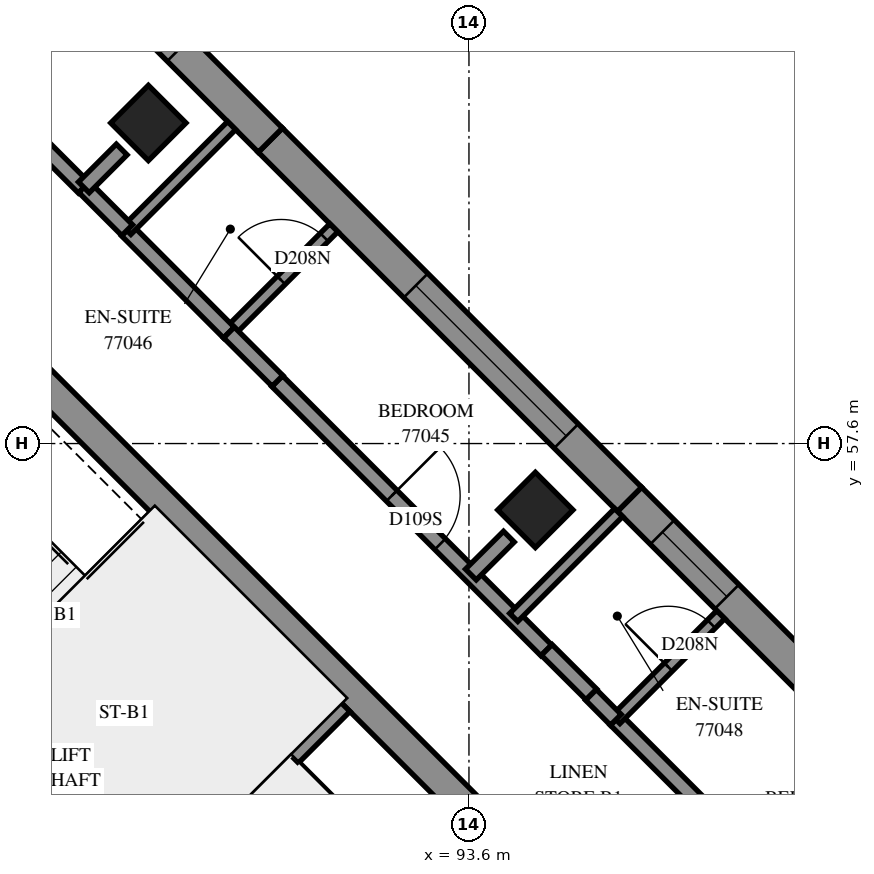
"""IFC4 building model, lengths in metres.
Left out: names, types, materials, properties, quantities, classifications, styles, units other than length and angle.
Written with IfcOpenShell. Run it as: python <this file> out.ifc"""

import sys

from ifc_helpers import new_model, si_unit, direction, frame, frame_2d, origin, origin_2d, place, context, subcontext, project, spatial, polyline, rectangle, outline, extrude, element, fill, save


model = new_model("IFC4")
c1 = context("Model", 3, precision=1e-05, world=origin(), true_north=direction((0.0, 1.0)))
c2 = subcontext(c1, "Body", "Model", "MODEL_VIEW")
j1 = project(units=[si_unit("LENGTHUNIT", "METRE"), si_unit("PLANEANGLEUNIT", "RADIAN")], contexts=[c1])
p1 = place(None, origin())
s1 = spatial("IfcSite", under=j1, at=p1, CompositionType="ELEMENT")
p2 = place(p1, origin())
s2 = spatial("IfcBuilding", under=s1, at=p2, CompositionType="ELEMENT")
p3 = place(p2, frame((0.0, 0.0, 281.2)))
s3 = spatial("IfcBuildingStorey", under=s2, at=p3, CompositionType="ELEMENT", Elevation=281.2)
for number, where, z_axis, x_axis in (
    (1, (89.382, 61.818, 0.0), (0.0, 0.0, 1.0), (0.707, -0.707, 0.0)),
    (2, (94.474, 56.727, 0.0), (0.0, 0.0, 1.0), (0.707, -0.707, 0.0)),
):
    element("IfcColumn", number, at=place(p3, frame(where, z_axis=z_axis, x_axis=x_axis)), inside=s3, PredefinedType="COLUMN", context=c2, shape_type="SweptSolid", body=[
        extrude(rectangle(XDim=0.7, YDim=0.7, at=origin_2d()), origin(), (0.0, 0.0, 1.0), 3.1),
    ])
p4 = place(p3, frame((86.695, 59.696, -0.3), z_axis=(0.0, 0.0, 1.0), x_axis=(0.7071100706, -0.7071034917, 0.0)))
e3 = element("IfcWall", 3, at=p4, inside=s3, PredefinedType="SHEAR", context=c2, shape_type="SweptSolid", body=[
    extrude(rectangle(XDim=15.2, YDim=0.4, at=frame_2d((7.6, 0.0))), origin(), (0.0, 0.0, 1.0), 2.7),
])
p5 = place(p4, frame((10.4, 0.0, 0.3)))
e4 = element("IfcOpeningElement", 4, at=p5, cuts=e3, PredefinedType="OPENING", context=c2, shape_type="SweptSolid", body=[
    extrude(rectangle(XDim=0.8, YDim=2.1, at=frame_2d((0.4, 1.05))), frame((0.0, 0.21, 0.0), z_axis=(0.0, -1.0, 0.0), x_axis=(1.0, 0.0, 0.0)), (0.0, 0.0, 1.0), 0.42),
])
p6 = place(p3, frame((81.534, 53.969, 0.0), z_axis=(0.0, 0.0, 1.0), x_axis=(0.707103309, -0.7071102534, 0.0)))
e5 = element("IfcWall", 5, at=p6, inside=s3, PredefinedType="SOLIDWALL", context=c2, shape_type="SweptSolid", body=[
    extrude(rectangle(XDim=14.4, YDim=0.3, at=frame_2d((7.2, 0.0))), origin(), (0.0, 0.0, 1.0), 3.1),
])
p7 = place(p6, frame((8.55, 0.0, 0.0)))
e6 = element("IfcOpeningElement", 6, at=p7, cuts=e5, PredefinedType="OPENING", context=c2, shape_type="SweptSolid", body=[
    extrude(rectangle(XDim=0.9, YDim=2.1, at=frame_2d((0.45, 1.05))), frame((0.0, 0.16, 0.0), z_axis=(0.0, -1.0, 0.0), x_axis=(1.0, 0.0, 0.0)), (0.0, 0.0, 1.0), 0.32),
])
p8 = place(p6, frame((1.25, 0.0, 0.0)))
e7 = element("IfcOpeningElement", 7, at=p8, cuts=e5, PredefinedType="OPENING", context=c2, shape_type="SweptSolid", body=[
    extrude(rectangle(XDim=1.1, YDim=2.1, at=frame_2d((0.55, 1.05))), frame((0.0, 0.16, 0.0), z_axis=(0.0, -1.0, 0.0), x_axis=(1.0, 0.0, 0.0)), (0.0, 0.0, 1.0), 0.32),
])
p9 = place(p6, frame((4.85, 0.0, 0.0)))
e8 = element("IfcOpeningElement", 8, at=p9, cuts=e5, PredefinedType="OPENING", context=c2, shape_type="SweptSolid", body=[
    extrude(rectangle(XDim=1.1, YDim=2.1, at=frame_2d((0.55, 1.05))), frame((0.0, 0.16, 0.0), z_axis=(0.0, -1.0, 0.0), x_axis=(1.0, 0.0, 0.0)), (0.0, 0.0, 1.0), 0.32),
])
p10 = place(p6, frame((12.05, 0.0, 0.0)))
e9 = element("IfcOpeningElement", 9, at=p10, cuts=e5, PredefinedType="OPENING", context=c2, shape_type="SweptSolid", body=[
    extrude(rectangle(XDim=1.1, YDim=2.1, at=frame_2d((0.55, 1.05))), frame((0.0, 0.16, 0.0), z_axis=(0.0, -1.0, 0.0), x_axis=(1.0, 0.0, 0.0)), (0.0, 0.0, 1.0), 0.32),
])
p11 = place(p3, frame((83.867, 56.302, 0.0), z_axis=(0.0, 0.0, 1.0), x_axis=(0.7071137256, -0.7070998367, 0.0)))
e10 = element("IfcWall", 10, at=p11, inside=s3, PredefinedType="SOLIDWALL", context=c2, shape_type="SweptSolid", body=[
    extrude(rectangle(XDim=7.2, YDim=0.3, at=frame_2d((3.6, 0.0))), origin(), (0.0, 0.0, 1.0), 3.1),
])
p12 = place(p3, frame((88.958, 51.211, 0.0), z_axis=(0.0, 0.0, 1.0), x_axis=(0.7071067812, 0.7071067812, 0.0)))
e11 = element("IfcWall", 11, at=p12, inside=s3, PredefinedType="SOLIDWALL", context=c2, shape_type="SweptSolid", body=[
    extrude(rectangle(XDim=4.2, YDim=0.3, at=frame_2d((2.1, 0.0))), origin(), (0.0, 0.0, 1.0), 3.1),
])
p13 = place(p3, frame((100.466, 52.113, 0.0), z_axis=(0.0, 0.0, 1.0), x_axis=(-0.7071067812, 0.7071067812, 0.0)))
e12 = element("IfcWall", 12, at=p13, inside=s3, PredefinedType="SOLIDWALL", context=c2, shape_type="SweptSolid", body=[
    extrude(outline(polyline([(0.04, -0.225), (6.722, -0.225), (6.722, 0.225), (-0.04, 0.225), (0.04, -0.225)])), origin(), (0.0, 0.0, 1.0), 3.1),
])
p14 = place(p13, frame((0.649, 0.0, 0.45)))
e13 = element("IfcOpeningElement", 13, at=p14, cuts=e12, PredefinedType="OPENING", context=c2, shape_type="SweptSolid", body=[
    extrude(rectangle(XDim=2.8, YDim=2.55, at=frame_2d((1.4, 1.275))), frame((0.0, 0.235, 0.0), z_axis=(0.0, -1.0, 0.0), x_axis=(1.0, 0.0, 0.0)), (0.0, 0.0, 1.0), 0.47),
])
p15 = place(p13, frame((4.911, 0.0, 0.45)))
e14 = element("IfcOpeningElement", 14, at=p15, cuts=e12, PredefinedType="OPENING", context=c2, shape_type="SweptSolid", body=[
    extrude(rectangle(XDim=1.2, YDim=2.55, at=frame_2d((0.6, 1.275))), frame((0.0, 0.235, 0.0), z_axis=(0.0, -1.0, 0.0), x_axis=(1.0, 0.0, 0.0)), (0.0, 0.0, 1.0), 0.47),
])
p16 = place(p3, frame((95.712, 56.867, 0.0), z_axis=(0.0, 0.0, 1.0), x_axis=(-0.7071067812, 0.7071067812, 0.0)))
e15 = element("IfcWall", 15, at=p16, inside=s3, PredefinedType="SOLIDWALL", context=c2, shape_type="SweptSolid", body=[
    extrude(outline(polyline([(0.0, -0.225), (6.682, -0.225), (6.682, 0.225), (0.0, 0.225), (0.0, -0.225)])), origin(), (0.0, 0.0, 1.0), 3.1),
])
p17 = place(p16, frame((1.177, 0.0, 0.45)))
e16 = element("IfcOpeningElement", 16, at=p17, cuts=e15, PredefinedType="OPENING", context=c2, shape_type="SweptSolid", body=[
    extrude(rectangle(XDim=2.8, YDim=2.55, at=frame_2d((1.4, 1.275))), frame((0.0, 0.235, 0.0), z_axis=(0.0, -1.0, 0.0), x_axis=(1.0, 0.0, 0.0)), (0.0, 0.0, 1.0), 0.47),
])
p18 = place(p3, frame((90.987, 61.592, 0.0), z_axis=(0.0, 0.0, 1.0), x_axis=(-0.7071067812, 0.7071067812, 0.0)))
e17 = element("IfcWall", 17, at=p18, inside=s3, PredefinedType="SOLIDWALL", context=c2, shape_type="SweptSolid", body=[
    extrude(outline(polyline([(0.0, -0.225), (6.682, -0.225), (6.724, 0.225), (0.0, 0.225), (0.0, -0.225)])), origin(), (0.0, 0.0, 1.0), 3.1),
])
p19 = place(p18, frame((1.695, 0.0, 0.45)))
e18 = element("IfcOpeningElement", 18, at=p19, cuts=e17, PredefinedType="OPENING", context=c2, shape_type="SweptSolid", body=[
    extrude(rectangle(XDim=2.8, YDim=2.55, at=frame_2d((1.4, 1.275))), frame((0.0, 0.235, 0.0), z_axis=(0.0, -1.0, 0.0), x_axis=(1.0, 0.0, 0.0)), (0.0, 0.0, 1.0), 0.47),
])
p20 = place(p18, frame((5.099, 0.0, 0.45)))
e19 = element("IfcOpeningElement", 19, at=p20, cuts=e17, PredefinedType="OPENING", context=c2, shape_type="SweptSolid", body=[
    extrude(rectangle(XDim=1.2, YDim=2.55, at=frame_2d((0.6, 1.275))), frame((0.0, 0.235, 0.0), z_axis=(0.0, -1.0, 0.0), x_axis=(1.0, 0.0, 0.0)), (0.0, 0.0, 1.0), 0.47),
])
p21 = place(p3, frame((91.313, 53.354, 0.0), z_axis=(0.0, 0.0, 1.0), x_axis=(0.7071067812, -0.7071067812, 0.0)))
e20 = element("IfcWall", 20, at=p21, inside=s3, PredefinedType="PARTITIONING", context=c2, shape_type="SweptSolid", body=[
    extrude(rectangle(XDim=5.65, YDim=0.15, at=frame_2d((2.825, 0.0))), origin(), (0.0, 0.0, 1.0), 3.1),
])
p22 = place(p3, frame((91.077, 58.421, 0.0), z_axis=(0.0, 0.0, 1.0), x_axis=(0.7069869563, -0.7072265858, 0.0)))
e21 = element("IfcWall", 21, at=p22, inside=s3, PredefinedType="PARTITIONING", context=c2, shape_type="SweptSolid", body=[
    extrude(rectangle(XDim=5.008, YDim=0.2, at=frame_2d((2.504, 0.0))), origin(), (0.0, 0.0, 1.0), 3.1),
])
p23 = place(p22, frame((2.132, 0.0, 0.0)))
e22 = element("IfcOpeningElement", 22, at=p23, cuts=e21, PredefinedType="OPENING", context=c2, shape_type="SweptSolid", body=[
    extrude(rectangle(XDim=0.9, YDim=2.1, at=frame_2d((0.45, 1.05))), frame((0.0, 0.11, 0.0), z_axis=(0.0, -1.0, 0.0), x_axis=(1.0, 0.0, 0.0)), (0.0, 0.0, 1.0), 0.22),
])
p24 = place(p3, frame((95.531, 53.965, 0.0), z_axis=(0.0, 0.0, 1.0), x_axis=(0.7071067812, -0.7071067812, 0.0)))
e23 = element("IfcWall", 23, at=p24, inside=s3, PredefinedType="PARTITIONING", context=c2, shape_type="SweptSolid", body=[
    extrude(rectangle(XDim=4.899, YDim=0.2, at=frame_2d((2.449, 0.0))), origin(), (0.0, 0.0, 1.0), 3.1),
])
p25 = place(p24, frame((3.031, 0.0, 0.0)))
e24 = element("IfcOpeningElement", 24, at=p25, cuts=e23, PredefinedType="OPENING", context=c2, shape_type="SweptSolid", body=[
    extrude(rectangle(XDim=0.9, YDim=2.1, at=frame_2d((0.45, 1.05))), frame((0.0, 0.11, 0.0), z_axis=(0.0, -1.0, 0.0), x_axis=(1.0, 0.0, 0.0)), (0.0, 0.0, 1.0), 0.22),
])
p26 = place(p3, frame((86.833, 62.663, 0.0), z_axis=(0.0, 0.0, 1.0), x_axis=(0.7075233388, -0.706689978, 0.0)))
e25 = element("IfcWall", 25, at=p26, inside=s3, PredefinedType="PARTITIONING", context=c2, shape_type="SweptSolid", body=[
    extrude(rectangle(XDim=2.4, YDim=0.2, at=frame_2d((1.2, 0.0))), origin(), (0.0, 0.0, 1.0), 3.1),
])
p27 = place(p3, frame((90.442, 59.06, 0.0), z_axis=(0.0, 0.0, 1.0), x_axis=(0.7076448457, 0.7065683069, 0.0)))
e26 = element("IfcWall", 26, at=p27, inside=s3, PredefinedType="PARTITIONING", context=c2, shape_type="SweptSolid", body=[
    extrude(rectangle(XDim=1.951, YDim=0.15, at=frame_2d((0.975, 0.0))), origin(), (0.0, 0.0, 1.0), 3.1),
])
p28 = place(p27, frame((0.973, 0.0, 0.0)))
e27 = element("IfcOpeningElement", 27, at=p28, cuts=e26, PredefinedType="OPENING", context=c2, shape_type="SweptSolid", body=[
    extrude(rectangle(XDim=0.8, YDim=2.1, at=frame_2d((0.4, 1.05))), frame((0.0, 0.085, 0.0), z_axis=(0.0, -1.0, 0.0), x_axis=(1.0, 0.0, 0.0)), (0.0, 0.0, 1.0), 0.17),
])
p29 = place(p3, frame((94.189, 55.313, 0.0), z_axis=(0.0, 0.0, 1.0), x_axis=(0.7070811488, 0.7071324126, 0.0)))
e28 = element("IfcWall", 28, at=p29, inside=s3, PredefinedType="PARTITIONING", context=c2, shape_type="SweptSolid", body=[
    extrude(rectangle(XDim=1.951, YDim=0.15, at=frame_2d((0.975, 0.0))), origin(), (0.0, 0.0, 1.0), 3.1),
])
p30 = place(p3, frame((95.533, 53.969, 0.0), z_axis=(0.0, 0.0, 1.0), x_axis=(0.7070811488, 0.7071324126, 0.0)))
e29 = element("IfcWall", 29, at=p30, inside=s3, PredefinedType="PARTITIONING", context=c2, shape_type="SweptSolid", body=[
    extrude(rectangle(XDim=1.951, YDim=0.15, at=frame_2d((0.975, 0.0))), origin(), (0.0, 0.0, 1.0), 3.1),
])
p31 = place(p30, frame((0.976, 0.0, 0.0)))
e30 = element("IfcOpeningElement", 30, at=p31, cuts=e29, PredefinedType="OPENING", context=c2, shape_type="SweptSolid", body=[
    extrude(rectangle(XDim=0.8, YDim=2.1, at=frame_2d((0.4, 1.05))), frame((0.0, 0.085, 0.0), z_axis=(0.0, -1.0, 0.0), x_axis=(1.0, 0.0, 0.0)), (0.0, 0.0, 1.0), 0.17),
])
p32 = place(p3, frame((89.1, 60.404, 0.0), z_axis=(0.0, 0.0, 1.0), x_axis=(0.7065800724, -0.7076330979, 0.0)))
e31 = element("IfcWall", 31, at=p32, inside=s3, PredefinedType="PARTITIONING", context=c2, shape_type="SweptSolid", body=[
    extrude(rectangle(XDim=1.899, YDim=0.2, at=frame_2d((0.95, 0.0))), origin(), (0.0, 0.0, 1.0), 3.1),
])
p33 = place(p3, frame((89.099, 60.405, 0.0), z_axis=(0.0, 0.0, 1.0), x_axis=(0.7070811302, 0.7071324312, 0.0)))
e32 = element("IfcWall", 32, at=p33, inside=s3, PredefinedType="PARTITIONING", context=c2, shape_type="SweptSolid", body=[
    extrude(rectangle(XDim=1.949, YDim=0.15, at=frame_2d((0.975, 0.0))), origin(), (0.0, 0.0, 1.0), 3.1),
])
p34 = place(p3, frame((90.443, 59.061, 0.0), z_axis=(0.0, 0.0, 1.0), x_axis=(0.7082159662, -0.7059958535, 0.0)))
e33 = element("IfcWall", 33, at=p34, inside=s3, PredefinedType="PARTITIONING", context=c2, shape_type="SweptSolid", body=[
    extrude(rectangle(XDim=0.901, YDim=0.2, at=frame_2d((0.451, 0.0))), origin(), (0.0, 0.0, 1.0), 3.1),
])
p35 = place(p3, frame((94.623, 54.885, 0.0), z_axis=(0.0, 0.0, 1.0), x_axis=(0.7083103646, -0.7059011457, 0.0)))
e34 = element("IfcWall", 34, at=p35, inside=s3, PredefinedType="PARTITIONING", context=c2, shape_type="SweptSolid", body=[
    extrude(rectangle(XDim=0.83, YDim=0.2, at=frame_2d((0.415, 0.0))), origin(), (0.0, 0.0, 1.0), 3.1),
])
p36 = place(p3, frame((88.537, 60.973, 0.0), z_axis=(0.0, 0.0, 1.0), x_axis=(0.7071067812, -0.7071067812, 0.0)))
e35 = element("IfcWall", 35, at=p36, inside=s3, PredefinedType="PARTITIONING", context=c2, shape_type="SweptSolid", body=[
    extrude(rectangle(XDim=0.8, YDim=0.2, at=frame_2d((0.4, 0.0))), origin(), (0.0, 0.0, 1.0), 3.1),
])
p37 = place(p3, frame((93.625, 55.877, 0.0), z_axis=(0.0, 0.0, 1.0), x_axis=(0.7085224061, 0.7056883165, 0.0)))
e36 = element("IfcWall", 36, at=p37, inside=s3, PredefinedType="PARTITIONING", context=c2, shape_type="SweptSolid", body=[
    extrude(rectangle(XDim=0.706, YDim=0.2, at=frame_2d((0.353, 0.0))), origin(), (0.0, 0.0, 1.0), 3.1),
])
p38 = place(p3, frame((88.534, 60.971, 0.0), z_axis=(0.0, 0.0, 1.0), x_axis=(0.7071067812, 0.7071067812, 0.0)))
e37 = element("IfcWall", 37, at=p38, inside=s3, PredefinedType="PARTITIONING", context=c2, shape_type="SweptSolid", body=[
    extrude(rectangle(XDim=0.704, YDim=0.2, at=frame_2d((0.352, 0.0))), origin(), (0.0, 0.0, 1.0), 3.1),
])
p39 = place(p3, frame((95.206, 54.294, 0.0), z_axis=(0.0, 0.0, 1.0), x_axis=(0.7049410788, -0.7092658707, 0.0)))
e38 = element("IfcWall", 38, at=p39, inside=s3, PredefinedType="PARTITIONING", context=c2, shape_type="SweptSolid", body=[
    extrude(rectangle(XDim=0.462, YDim=0.2, at=frame_2d((0.231, 0.0))), origin(), (0.0, 0.0, 1.0), 3.1),
])
p40 = place(p14, origin())
e39 = element("IfcWindow", 39, at=p40, inside=s3, PartitioningType="SINGLE_PANEL", PredefinedType="WINDOW", context=c2, shape_type="SweptSolid", body=[
    extrude(rectangle(XDim=2.8, YDim=2.55, at=frame_2d((1.4, 1.275))), frame((0.0, 0.205, 0.0), z_axis=(0.0, -1.0, 0.0), x_axis=(1.0, 0.0, 0.0)), (0.0, 0.0, 1.0), 0.06),
])
fill(e13, e39)
p41 = place(p15, origin())
e40 = element("IfcWindow", 40, at=p41, inside=s3, PartitioningType="SINGLE_PANEL", PredefinedType="WINDOW", context=c2, shape_type="SweptSolid", body=[
    extrude(rectangle(XDim=1.2, YDim=2.55, at=frame_2d((0.6, 1.275))), frame((0.0, 0.205, 0.0), z_axis=(0.0, -1.0, 0.0), x_axis=(1.0, 0.0, 0.0)), (0.0, 0.0, 1.0), 0.06),
])
fill(e14, e40)
p42 = place(p17, origin())
e41 = element("IfcWindow", 41, at=p42, inside=s3, PartitioningType="SINGLE_PANEL", PredefinedType="WINDOW", context=c2, shape_type="SweptSolid", body=[
    extrude(rectangle(XDim=2.8, YDim=2.55, at=frame_2d((1.4, 1.275))), frame((0.0, 0.205, 0.0), z_axis=(0.0, -1.0, 0.0), x_axis=(1.0, 0.0, 0.0)), (0.0, 0.0, 1.0), 0.06),
])
fill(e16, e41)
p43 = place(p19, origin())
e42 = element("IfcWindow", 42, at=p43, inside=s3, PartitioningType="SINGLE_PANEL", PredefinedType="WINDOW", context=c2, shape_type="SweptSolid", body=[
    extrude(rectangle(XDim=2.8, YDim=2.55, at=frame_2d((1.4, 1.275))), frame((0.0, 0.205, 0.0), z_axis=(0.0, -1.0, 0.0), x_axis=(1.0, 0.0, 0.0)), (0.0, 0.0, 1.0), 0.06),
])
fill(e18, e42)
p44 = place(p23, origin())
e43 = element("IfcDoor", 43, at=p44, inside=s3, OperationType="SINGLE_SWING_LEFT", PredefinedType="DOOR", context=c2, shape_type="SweptSolid", body=[
    extrude(rectangle(XDim=0.9, YDim=2.1, at=frame_2d((0.45, 1.05))), frame((0.0, 0.025, 0.0), z_axis=(0.0, -1.0, 0.0), x_axis=(1.0, 0.0, 0.0)), (0.0, 0.0, 1.0), 0.05),
])
fill(e22, e43)
p45 = place(p28, origin())
e44 = element("IfcDoor", 44, at=p45, inside=s3, OperationType="SINGLE_SWING_RIGHT", PredefinedType="DOOR", context=c2, shape_type="SweptSolid", body=[
    extrude(rectangle(XDim=0.8, YDim=2.1, at=frame_2d((0.4, 1.05))), frame((0.0, 0.025, 0.0), z_axis=(0.0, -1.0, 0.0), x_axis=(1.0, 0.0, 0.0)), (0.0, 0.0, 1.0), 0.05),
])
fill(e27, e44)
p46 = place(p31, origin())
e45 = element("IfcDoor", 45, at=p46, inside=s3, OperationType="SINGLE_SWING_RIGHT", PredefinedType="DOOR", context=c2, shape_type="SweptSolid", body=[
    extrude(rectangle(XDim=0.8, YDim=2.1, at=frame_2d((0.4, 1.05))), frame((0.0, 0.025, 0.0), z_axis=(0.0, -1.0, 0.0), x_axis=(1.0, 0.0, 0.0)), (0.0, 0.0, 1.0), 0.05),
])
fill(e30, e45)
save(model, sys.argv[1])
